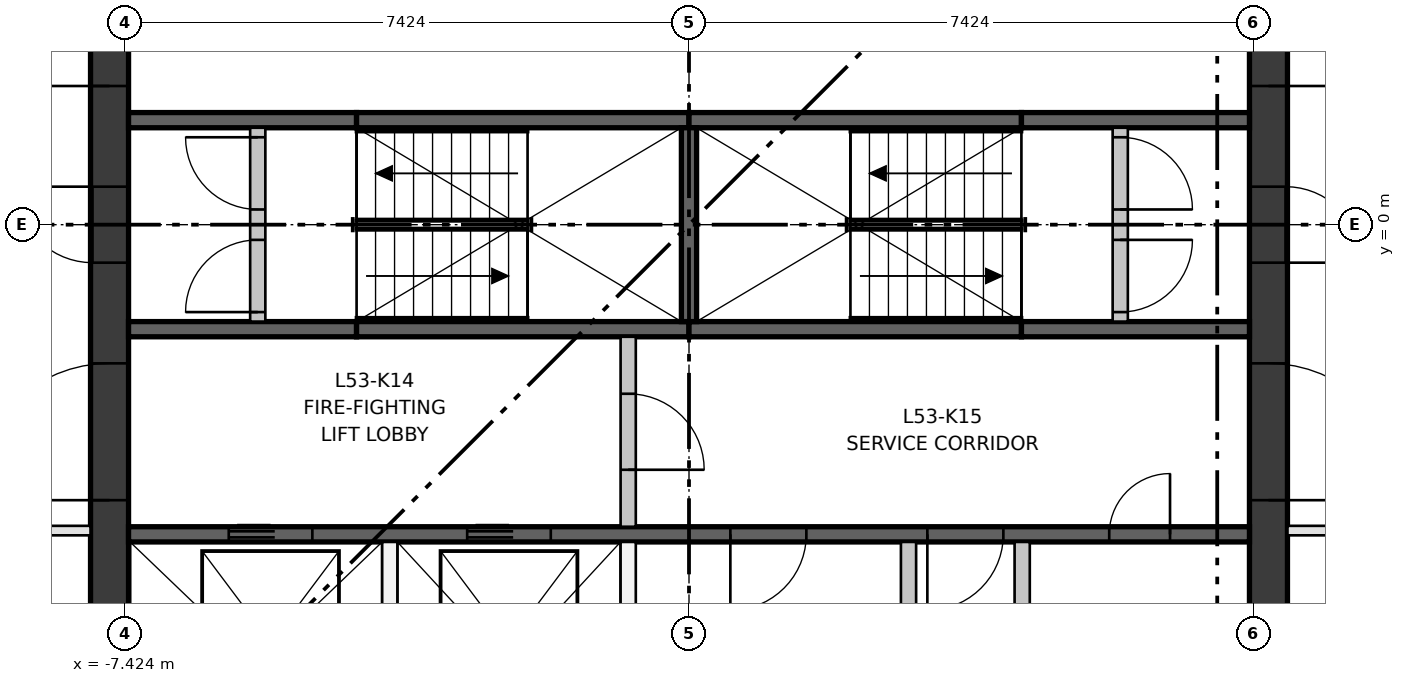
"""IFC4 building model, lengths in metres.
Left out: names, types, materials, properties, quantities, classifications, styles, units other than length and angle.
Written with IfcOpenShell. Run it as: python <this file> out.ifc"""

import sys

from ifc_helpers import new_model, si_unit, direction, frame, frame_2d, origin, place, context, subcontext, project, spatial, rectangle, extrude, element, fill, save


model = new_model("IFC4")
c1 = context("Model", 3, precision=1e-05, world=origin(), true_north=direction((0.0, 1.0)))
c2 = subcontext(c1, "Body", "Model", "MODEL_VIEW")
j1 = project(units=[si_unit("LENGTHUNIT", "METRE"), si_unit("PLANEANGLEUNIT", "RADIAN")], contexts=[c1])
p1 = place(None, origin())
s1 = spatial("IfcSite", under=j1, at=p1, CompositionType="ELEMENT")
p2 = place(p1, origin())
s2 = spatial("IfcBuilding", under=s1, at=p2, CompositionType="ELEMENT")
p3 = place(p2, frame((0.0, 0.0, 197.7)))
s3 = spatial("IfcBuildingStorey", under=s2, at=p3, CompositionType="ELEMENT", Elevation=197.7)
p4 = place(p3, frame((-7.624, -7.374, 0.0), z_axis=(0.0, 0.0, 1.0), x_axis=(0.0, 1.0, 0.0)))
e1 = element("IfcWall", 1, at=p4, inside=s3, PredefinedType="SHEAR", context=c2, shape_type="SweptSolid", body=[
    extrude(rectangle(XDim=14.748, YDim=0.5, at=frame_2d((7.374, 0.0))), origin(), (0.0, 0.0, 1.0), 3.35),
])
p5 = place(p4, frame((6.874, 0.0, 0.0)))
e2 = element("IfcOpeningElement", 2, at=p5, cuts=e1, PredefinedType="OPENING", context=c2, shape_type="SweptSolid", body=[
    extrude(rectangle(XDim=1.0, YDim=2.1, at=frame_2d((0.5, 1.05))), frame((0.0, 0.26, 0.0), z_axis=(0.0, -1.0, 0.0), x_axis=(1.0, 0.0, 0.0)), (0.0, 0.0, 1.0), 0.52),
])
p6 = place(p4, frame((3.75, 0.0, 0.0)))
e3 = element("IfcOpeningElement", 3, at=p6, cuts=e1, PredefinedType="OPENING", context=c2, shape_type="SweptSolid", body=[
    extrude(rectangle(XDim=1.8, YDim=2.1, at=frame_2d((0.9, 1.05))), frame((0.0, 0.26, 0.0), z_axis=(0.0, -1.0, 0.0), x_axis=(1.0, 0.0, 0.0)), (0.0, 0.0, 1.0), 0.52),
])
p7 = place(p4, frame((9.198, 0.0, 0.0)))
e4 = element("IfcOpeningElement", 4, at=p7, cuts=e1, PredefinedType="OPENING", context=c2, shape_type="SweptSolid", body=[
    extrude(rectangle(XDim=1.8, YDim=2.1, at=frame_2d((0.9, 1.05))), frame((0.0, 0.26, 0.0), z_axis=(0.0, -1.0, 0.0), x_axis=(1.0, 0.0, 0.0)), (0.0, 0.0, 1.0), 0.52),
])
p8 = place(p3, frame((7.624, -7.374, 0.0), z_axis=(0.0, 0.0, 1.0), x_axis=(0.0, 1.0, 0.0)))
e5 = element("IfcWall", 5, at=p8, inside=s3, PredefinedType="SHEAR", context=c2, shape_type="SweptSolid", body=[
    extrude(rectangle(XDim=14.748, YDim=0.5, at=frame_2d((7.374, 0.0))), origin(), (0.0, 0.0, 1.0), 3.35),
])
p9 = place(p8, frame((6.874, 0.0, 0.0)))
e6 = element("IfcOpeningElement", 6, at=p9, cuts=e5, PredefinedType="OPENING", context=c2, shape_type="SweptSolid", body=[
    extrude(rectangle(XDim=1.0, YDim=2.1, at=frame_2d((0.5, 1.05))), frame((0.0, 0.26, 0.0), z_axis=(0.0, -1.0, 0.0), x_axis=(1.0, 0.0, 0.0)), (0.0, 0.0, 1.0), 0.52),
])
p10 = place(p8, frame((3.75, 0.0, 0.0)))
e7 = element("IfcOpeningElement", 7, at=p10, cuts=e5, PredefinedType="OPENING", context=c2, shape_type="SweptSolid", body=[
    extrude(rectangle(XDim=1.8, YDim=2.1, at=frame_2d((0.9, 1.05))), frame((0.0, 0.26, 0.0), z_axis=(0.0, -1.0, 0.0), x_axis=(1.0, 0.0, 0.0)), (0.0, 0.0, 1.0), 0.52),
])
p11 = place(p8, frame((9.198, 0.0, 0.0)))
e8 = element("IfcOpeningElement", 8, at=p11, cuts=e5, PredefinedType="OPENING", context=c2, shape_type="SweptSolid", body=[
    extrude(rectangle(XDim=1.8, YDim=2.1, at=frame_2d((0.9, 1.05))), frame((0.0, 0.26, 0.0), z_axis=(0.0, -1.0, 0.0), x_axis=(1.0, 0.0, 0.0)), (0.0, 0.0, 1.0), 0.52),
])
p12 = place(p3, frame((-7.374, -4.074, 0.0), z_axis=(0.0, 0.0, 1.0), x_axis=(1.0, 0.0, 0.0)))
e9 = element("IfcWall", 9, at=p12, inside=s3, PredefinedType="SHEAR", context=c2, shape_type="SweptSolid", body=[
    extrude(rectangle(XDim=14.748, YDim=0.2, at=frame_2d((7.374, 0.0))), origin(), (0.0, 0.0, 1.0), 3.0),
])
p13 = place(p12, frame((1.319, 0.0, 0.0)))
e10 = element("IfcOpeningElement", 10, at=p13, cuts=e9, PredefinedType="OPENING", context=c2, shape_type="SweptSolid", body=[
    extrude(rectangle(XDim=1.1, YDim=2.1, at=frame_2d((0.55, 1.05))), frame((0.0, 0.11, 0.0), z_axis=(0.0, -1.0, 0.0), x_axis=(1.0, 0.0, 0.0)), (0.0, 0.0, 1.0), 0.22),
])
p14 = place(p12, frame((4.456, 0.0, 0.0)))
e11 = element("IfcOpeningElement", 11, at=p14, cuts=e9, PredefinedType="OPENING", context=c2, shape_type="SweptSolid", body=[
    extrude(rectangle(XDim=1.1, YDim=2.1, at=frame_2d((0.55, 1.05))), frame((0.0, 0.11, 0.0), z_axis=(0.0, -1.0, 0.0), x_axis=(1.0, 0.0, 0.0)), (0.0, 0.0, 1.0), 0.22),
])
p15 = place(p12, frame((7.918, 0.0, 0.0)))
e12 = element("IfcOpeningElement", 12, at=p15, cuts=e9, PredefinedType="OPENING", context=c2, shape_type="SweptSolid", body=[
    extrude(rectangle(XDim=1.0, YDim=2.1, at=frame_2d((0.5, 1.05))), frame((0.0, 0.11, 0.0), z_axis=(0.0, -1.0, 0.0), x_axis=(1.0, 0.0, 0.0)), (0.0, 0.0, 1.0), 0.22),
])
p16 = place(p12, frame((10.51, 0.0, 0.0)))
e13 = element("IfcOpeningElement", 13, at=p16, cuts=e9, PredefinedType="OPENING", context=c2, shape_type="SweptSolid", body=[
    extrude(rectangle(XDim=1.0, YDim=2.1, at=frame_2d((0.5, 1.05))), frame((0.0, 0.11, 0.0), z_axis=(0.0, -1.0, 0.0), x_axis=(1.0, 0.0, 0.0)), (0.0, 0.0, 1.0), 0.22),
])
p17 = place(p12, frame((12.903, 0.0, 0.0)))
e14 = element("IfcOpeningElement", 14, at=p17, cuts=e9, PredefinedType="OPENING", context=c2, shape_type="SweptSolid", body=[
    extrude(rectangle(XDim=0.8, YDim=2.1, at=frame_2d((0.4, 1.05))), frame((0.0, 0.11, 0.0), z_axis=(0.0, -1.0, 0.0), x_axis=(1.0, 0.0, 0.0)), (0.0, 0.0, 1.0), 0.22),
])
p18 = place(p3, frame((-7.374, -1.375, 0.0), z_axis=(0.0, 0.0, 1.0), x_axis=(1.0, 0.0, 0.0)))
e15 = element("IfcWall", 15, at=p18, inside=s3, PredefinedType="SHEAR", context=c2, shape_type="SweptSolid", body=[
    extrude(rectangle(XDim=3.0, YDim=0.2, at=frame_2d((1.5, 0.0))), origin(), (0.0, 0.0, 1.0), 3.0),
])
for number, where, z_axis, x_axis in (
    (16, (-4.374, -1.375, 0.0), (0.0, 0.0, 1.0), (1.0, 0.0, 0.0)),
    (17, (0.0, -1.375, 0.0), (0.0, 0.0, 1.0), (1.0, 0.0, 0.0)),
):
    element("IfcWall", number, at=place(p3, frame(where, z_axis=z_axis, x_axis=x_axis)), inside=s3, PredefinedType="SHEAR", context=c2, shape_type="SweptSolid", body=[
        extrude(rectangle(XDim=4.374, YDim=0.2, at=frame_2d((2.187, 0.0))), origin(), (0.0, 0.0, 1.0), 3.0),
    ])
for number, where, z_axis, x_axis in (
    (18, (4.374, -1.375, 0.0), (0.0, 0.0, 1.0), (1.0, 0.0, 0.0)),
    (19, (-7.374, 1.375, 0.0), (0.0, 0.0, 1.0), (1.0, 0.0, 0.0)),
):
    element("IfcWall", number, at=place(p3, frame(where, z_axis=z_axis, x_axis=x_axis)), inside=s3, PredefinedType="SHEAR", context=c2, shape_type="SweptSolid", body=[
        extrude(rectangle(XDim=3.0, YDim=0.2, at=frame_2d((1.5, 0.0))), origin(), (0.0, 0.0, 1.0), 3.0),
    ])
for number, where, z_axis, x_axis in (
    (20, (-4.374, 1.375, 0.0), (0.0, 0.0, 1.0), (1.0, 0.0, 0.0)),
    (21, (0.0, 1.375, 0.0), (0.0, 0.0, 1.0), (1.0, 0.0, 0.0)),
):
    element("IfcWall", number, at=place(p3, frame(where, z_axis=z_axis, x_axis=x_axis)), inside=s3, PredefinedType="SHEAR", context=c2, shape_type="SweptSolid", body=[
        extrude(rectangle(XDim=4.374, YDim=0.2, at=frame_2d((2.187, 0.0))), origin(), (0.0, 0.0, 1.0), 3.0),
    ])
p19 = place(p3, frame((4.374, 1.375, 0.0), z_axis=(0.0, 0.0, 1.0), x_axis=(1.0, 0.0, 0.0)))
e22 = element("IfcWall", 22, at=p19, inside=s3, PredefinedType="SHEAR", context=c2, shape_type="SweptSolid", body=[
    extrude(rectangle(XDim=3.0, YDim=0.2, at=frame_2d((1.5, 0.0))), origin(), (0.0, 0.0, 1.0), 3.0),
])
p20 = place(p3, frame((0.0, -1.275, 0.0), z_axis=(0.0, 0.0, 1.0), x_axis=(0.0, 1.0, 0.0)))
e23 = element("IfcWall", 23, at=p20, inside=s3, PredefinedType="SHEAR", context=c2, shape_type="SweptSolid", body=[
    extrude(rectangle(XDim=2.55, YDim=0.2, at=frame_2d((1.275, 0.0))), origin(), (0.0, 0.0, 1.0), 3.0),
])
for number, where, z_axis, x_axis in (
    (24, (-3.937, -7.374, 0.0), (0.0, 0.0, 1.0), (0.0, 1.0, 0.0)),
    (25, (-0.8, -7.374, 0.0), (0.0, 0.0, 1.0), (0.0, 1.0, 0.0)),
):
    element("IfcWall", number, at=place(p3, frame(where, z_axis=z_axis, x_axis=x_axis)), inside=s3, PredefinedType="PARTITIONING", context=c2, shape_type="SweptSolid", body=[
        extrude(rectangle(XDim=3.2, YDim=0.2, at=frame_2d((1.6, 0.0))), origin(), (0.0, 0.0, 1.0), 3.0),
    ])
p21 = place(p3, frame((-0.8, -3.974, 0.0), z_axis=(0.0, 0.0, 1.0), x_axis=(0.0, 1.0, 0.0)))
e26 = element("IfcWall", 26, at=p21, inside=s3, PredefinedType="PARTITIONING", context=c2, shape_type="SweptSolid", body=[
    extrude(rectangle(XDim=2.499, YDim=0.2, at=frame_2d((1.25, 0.0))), origin(), (0.0, 0.0, 1.0), 3.0),
])
p22 = place(p21, frame((0.75, 0.0, 0.0)))
e27 = element("IfcOpeningElement", 27, at=p22, cuts=e26, PredefinedType="OPENING", context=c2, shape_type="SweptSolid", body=[
    extrude(rectangle(XDim=1.0, YDim=2.1, at=frame_2d((0.5, 1.05))), frame((0.0, 0.11, 0.0), z_axis=(0.0, -1.0, 0.0), x_axis=(1.0, 0.0, 0.0)), (0.0, 0.0, 1.0), 0.22),
])
for number, where, z_axis, x_axis in (
    (28, (2.888, -7.374, 0.0), (0.0, 0.0, 1.0), (0.0, 1.0, 0.0)),
    (29, (4.384, -7.374, 0.0), (0.0, 0.0, 1.0), (0.0, 1.0, 0.0)),
):
    element("IfcWall", number, at=place(p3, frame(where, z_axis=z_axis, x_axis=x_axis)), inside=s3, PredefinedType="PARTITIONING", context=c2, shape_type="SweptSolid", body=[
        extrude(rectangle(XDim=3.2, YDim=0.2, at=frame_2d((1.6, 0.0))), origin(), (0.0, 0.0, 1.0), 3.0),
    ])
p23 = place(p3, frame((-5.674, -1.275, 0.0), z_axis=(0.0, 0.0, 1.0), x_axis=(0.0, 1.0, 0.0)))
e30 = element("IfcWall", 30, at=p23, inside=s3, PredefinedType="PARTITIONING", context=c2, shape_type="SweptSolid", body=[
    extrude(rectangle(XDim=2.55, YDim=0.2, at=frame_2d((1.275, 0.0))), origin(), (0.0, 0.0, 1.0), 3.0),
])
p24 = place(p23, frame((0.125, 0.0, 0.0)))
e31 = element("IfcOpeningElement", 31, at=p24, cuts=e30, PredefinedType="OPENING", context=c2, shape_type="SweptSolid", body=[
    extrude(rectangle(XDim=0.95, YDim=2.1, at=frame_2d((0.475, 1.05))), frame((0.0, 0.11, 0.0), z_axis=(0.0, -1.0, 0.0), x_axis=(1.0, 0.0, 0.0)), (0.0, 0.0, 1.0), 0.22),
])
p25 = place(p23, frame((1.475, 0.0, 0.0)))
e32 = element("IfcOpeningElement", 32, at=p25, cuts=e30, PredefinedType="OPENING", context=c2, shape_type="SweptSolid", body=[
    extrude(rectangle(XDim=0.95, YDim=2.1, at=frame_2d((0.475, 1.05))), frame((0.0, 0.11, 0.0), z_axis=(0.0, -1.0, 0.0), x_axis=(1.0, 0.0, 0.0)), (0.0, 0.0, 1.0), 0.22),
])
p26 = place(p3, frame((5.674, -1.275, 0.0), z_axis=(0.0, 0.0, 1.0), x_axis=(0.0, 1.0, 0.0)))
e33 = element("IfcWall", 33, at=p26, inside=s3, PredefinedType="PARTITIONING", context=c2, shape_type="SweptSolid", body=[
    extrude(rectangle(XDim=2.55, YDim=0.2, at=frame_2d((1.275, 0.0))), origin(), (0.0, 0.0, 1.0), 3.0),
])
p27 = place(p26, frame((0.125, 0.0, 0.0)))
e34 = element("IfcOpeningElement", 34, at=p27, cuts=e33, PredefinedType="OPENING", context=c2, shape_type="SweptSolid", body=[
    extrude(rectangle(XDim=0.95, YDim=2.1, at=frame_2d((0.475, 1.05))), frame((0.0, 0.11, 0.0), z_axis=(0.0, -1.0, 0.0), x_axis=(1.0, 0.0, 0.0)), (0.0, 0.0, 1.0), 0.22),
])
p28 = place(p26, frame((1.475, 0.0, 0.0)))
e35 = element("IfcOpeningElement", 35, at=p28, cuts=e33, PredefinedType="OPENING", context=c2, shape_type="SweptSolid", body=[
    extrude(rectangle(XDim=0.95, YDim=2.1, at=frame_2d((0.475, 1.05))), frame((0.0, 0.11, 0.0), z_axis=(0.0, -1.0, 0.0), x_axis=(1.0, 0.0, 0.0)), (0.0, 0.0, 1.0), 0.22),
])
p29 = place(p3, frame((12.404, -4.024, 0.0), z_axis=(0.0, 0.0, 1.0), x_axis=(-1.0, 0.0, 0.0)))
e36 = element("IfcWall", 36, at=p29, inside=s3, PredefinedType="PARTITIONING", context=c2, shape_type="SweptSolid", body=[
    extrude(rectangle(XDim=4.53, YDim=0.125, at=frame_2d((2.265, 0.0))), origin(), (0.0, 0.0, 1.0), 3.0),
])
p30 = place(p29, frame((1.4, 0.0, 0.0)))
e37 = element("IfcOpeningElement", 37, at=p30, cuts=e36, PredefinedType="OPENING", context=c2, shape_type="SweptSolid", body=[
    extrude(rectangle(XDim=1.8, YDim=2.1, at=frame_2d((0.9, 1.05))), frame((0.0, 0.073, 0.0), z_axis=(0.0, -1.0, 0.0), x_axis=(1.0, 0.0, 0.0)), (0.0, 0.0, 1.0), 0.145),
])
p31 = place(p3, frame((-7.874, -4.024, 0.0), z_axis=(0.0, 0.0, 1.0), x_axis=(-1.0, 0.0, 0.0)))
e38 = element("IfcWall", 38, at=p31, inside=s3, PredefinedType="PARTITIONING", context=c2, shape_type="SweptSolid", body=[
    extrude(rectangle(XDim=4.951, YDim=0.125, at=frame_2d((2.476, 0.0))), origin(), (0.0, 0.0, 1.0), 3.0),
])
p32 = place(p31, frame((1.6, 0.0, 0.0)))
e39 = element("IfcOpeningElement", 39, at=p32, cuts=e38, PredefinedType="OPENING", context=c2, shape_type="SweptSolid", body=[
    extrude(rectangle(XDim=1.8, YDim=2.1, at=frame_2d((0.9, 1.05))), frame((0.0, 0.073, 0.0), z_axis=(0.0, -1.0, 0.0), x_axis=(1.0, 0.0, 0.0)), (0.0, 0.0, 1.0), 0.145),
])
p33 = place(p13, origin())
e40 = element("IfcDoor", 40, at=p33, inside=s3, OperationType="DOUBLE_DOOR_SLIDING", PredefinedType="DOOR", context=c2, shape_type="SweptSolid", body=[
    extrude(rectangle(XDim=1.1, YDim=2.1, at=frame_2d((0.55, 1.05))), frame((0.0, 0.025, 0.0), z_axis=(0.0, -1.0, 0.0), x_axis=(1.0, 0.0, 0.0)), (0.0, 0.0, 1.0), 0.05),
])
fill(e10, e40)
p34 = place(p14, origin())
e41 = element("IfcDoor", 41, at=p34, inside=s3, OperationType="DOUBLE_DOOR_SLIDING", PredefinedType="DOOR", context=c2, shape_type="SweptSolid", body=[
    extrude(rectangle(XDim=1.1, YDim=2.1, at=frame_2d((0.55, 1.05))), frame((0.0, 0.025, 0.0), z_axis=(0.0, -1.0, 0.0), x_axis=(1.0, 0.0, 0.0)), (0.0, 0.0, 1.0), 0.05),
])
fill(e11, e41)
p35 = place(p24, origin())
e42 = element("IfcDoor", 42, at=p35, inside=s3, OperationType="SINGLE_SWING_LEFT", PredefinedType="DOOR", context=c2, shape_type="SweptSolid", body=[
    extrude(rectangle(XDim=0.95, YDim=2.1, at=frame_2d((0.475, 1.05))), frame((0.0, 0.025, 0.0), z_axis=(0.0, -1.0, 0.0), x_axis=(1.0, 0.0, 0.0)), (0.0, 0.0, 1.0), 0.05),
])
fill(e31, e42)
p36 = place(p25, origin())
e43 = element("IfcDoor", 43, at=p36, inside=s3, OperationType="SINGLE_SWING_RIGHT", PredefinedType="DOOR", context=c2, shape_type="SweptSolid", body=[
    extrude(rectangle(XDim=0.95, YDim=2.1, at=frame_2d((0.475, 1.05))), frame((0.0, 0.025, 0.0), z_axis=(0.0, -1.0, 0.0), x_axis=(1.0, 0.0, 0.0)), (0.0, 0.0, 1.0), 0.05),
])
fill(e32, e43)
p37 = place(p27, frame((0.95, 0.0, 0.0), z_axis=(0.0, 0.0, 1.0), x_axis=(-1.0, 0.0, 0.0)))
e44 = element("IfcDoor", 44, at=p37, inside=s3, OperationType="SINGLE_SWING_RIGHT", PredefinedType="DOOR", context=c2, shape_type="SweptSolid", body=[
    extrude(rectangle(XDim=0.95, YDim=2.1, at=frame_2d((0.475, 1.05))), frame((0.0, 0.025, 0.0), z_axis=(0.0, -1.0, 0.0), x_axis=(1.0, 0.0, 0.0)), (0.0, 0.0, 1.0), 0.05),
])
fill(e34, e44)
p38 = place(p28, frame((0.95, 0.0, 0.0), z_axis=(0.0, 0.0, 1.0), x_axis=(-1.0, 0.0, 0.0)))
e45 = element("IfcDoor", 45, at=p38, inside=s3, OperationType="SINGLE_SWING_LEFT", PredefinedType="DOOR", context=c2, shape_type="SweptSolid", body=[
    extrude(rectangle(XDim=0.95, YDim=2.1, at=frame_2d((0.475, 1.05))), frame((0.0, 0.025, 0.0), z_axis=(0.0, -1.0, 0.0), x_axis=(1.0, 0.0, 0.0)), (0.0, 0.0, 1.0), 0.05),
])
fill(e35, e45)
p39 = place(p22, frame((1.0, 0.0, 0.0), z_axis=(0.0, 0.0, 1.0), x_axis=(-1.0, 0.0, 0.0)))
e46 = element("IfcDoor", 46, at=p39, inside=s3, OperationType="SINGLE_SWING_LEFT", PredefinedType="DOOR", context=c2, shape_type="SweptSolid", body=[
    extrude(rectangle(XDim=1.0, YDim=2.1, at=frame_2d((0.5, 1.05))), frame((0.0, 0.025, 0.0), z_axis=(0.0, -1.0, 0.0), x_axis=(1.0, 0.0, 0.0)), (0.0, 0.0, 1.0), 0.05),
])
fill(e27, e46)
p40 = place(p15, frame((1.0, 0.0, 0.0), z_axis=(0.0, 0.0, 1.0), x_axis=(-1.0, 0.0, 0.0)))
e47 = element("IfcDoor", 47, at=p40, inside=s3, OperationType="SINGLE_SWING_LEFT", PredefinedType="DOOR", context=c2, shape_type="SweptSolid", body=[
    extrude(rectangle(XDim=1.0, YDim=2.1, at=frame_2d((0.5, 1.05))), frame((0.0, 0.025, 0.0), z_axis=(0.0, -1.0, 0.0), x_axis=(1.0, 0.0, 0.0)), (0.0, 0.0, 1.0), 0.05),
])
fill(e12, e47)
p41 = place(p16, frame((1.0, 0.0, 0.0), z_axis=(0.0, 0.0, 1.0), x_axis=(-1.0, 0.0, 0.0)))
e48 = element("IfcDoor", 48, at=p41, inside=s3, OperationType="SINGLE_SWING_LEFT", PredefinedType="DOOR", context=c2, shape_type="SweptSolid", body=[
    extrude(rectangle(XDim=1.0, YDim=2.1, at=frame_2d((0.5, 1.05))), frame((0.0, 0.025, 0.0), z_axis=(0.0, -1.0, 0.0), x_axis=(1.0, 0.0, 0.0)), (0.0, 0.0, 1.0), 0.05),
])
fill(e13, e48)
p42 = place(p17, origin())
e49 = element("IfcDoor", 49, at=p42, inside=s3, OperationType="SINGLE_SWING_RIGHT", PredefinedType="DOOR", context=c2, shape_type="SweptSolid", body=[
    extrude(rectangle(XDim=0.8, YDim=2.1, at=frame_2d((0.4, 1.05))), frame((0.0, 0.025, 0.0), z_axis=(0.0, -1.0, 0.0), x_axis=(1.0, 0.0, 0.0)), (0.0, 0.0, 1.0), 0.05),
])
fill(e14, e49)
p43 = place(p5, origin())
e50 = element("IfcDoor", 50, at=p43, inside=s3, OperationType="SINGLE_SWING_RIGHT", PredefinedType="DOOR", context=c2, shape_type="SweptSolid", body=[
    extrude(rectangle(XDim=1.0, YDim=2.1, at=frame_2d((0.5, 1.05))), frame((0.0, 0.25, 0.0), z_axis=(0.0, -1.0, 0.0), x_axis=(1.0, 0.0, 0.0)), (0.0, 0.0, 1.0), 0.05),
])
fill(e2, e50)
p44 = place(p6, origin())
e51 = element("IfcDoor", 51, at=p44, inside=s3, OperationType="DOUBLE_DOOR_SINGLE_SWING", PredefinedType="DOOR", context=c2, shape_type="SweptSolid", body=[
    extrude(rectangle(XDim=1.8, YDim=2.1, at=frame_2d((0.9, 1.05))), frame((0.0, 0.025, 0.0), z_axis=(0.0, -1.0, 0.0), x_axis=(1.0, 0.0, 0.0)), (0.0, 0.0, 1.0), 0.05),
])
fill(e3, e51)
p45 = place(p7, origin())
e52 = element("IfcDoor", 52, at=p45, inside=s3, OperationType="DOUBLE_DOOR_SINGLE_SWING", PredefinedType="DOOR", context=c2, shape_type="SweptSolid", body=[
    extrude(rectangle(XDim=1.8, YDim=2.1, at=frame_2d((0.9, 1.05))), frame((0.0, 0.025, 0.0), z_axis=(0.0, -1.0, 0.0), x_axis=(1.0, 0.0, 0.0)), (0.0, 0.0, 1.0), 0.05),
])
fill(e4, e52)
p46 = place(p9, frame((1.0, 0.0, 0.0), z_axis=(0.0, 0.0, 1.0), x_axis=(-1.0, 0.0, 0.0)))
e53 = element("IfcDoor", 53, at=p46, inside=s3, OperationType="SINGLE_SWING_LEFT", PredefinedType="DOOR", context=c2, shape_type="SweptSolid", body=[
    extrude(rectangle(XDim=1.0, YDim=2.1, at=frame_2d((0.5, 1.05))), frame((0.0, 0.25, 0.0), z_axis=(0.0, -1.0, 0.0), x_axis=(1.0, 0.0, 0.0)), (0.0, 0.0, 1.0), 0.05),
])
fill(e6, e53)
p47 = place(p10, frame((1.8, 0.0, 0.0), z_axis=(0.0, 0.0, 1.0), x_axis=(-1.0, 0.0, 0.0)))
e54 = element("IfcDoor", 54, at=p47, inside=s3, OperationType="DOUBLE_DOOR_SINGLE_SWING", PredefinedType="DOOR", context=c2, shape_type="SweptSolid", body=[
    extrude(rectangle(XDim=1.8, YDim=2.1, at=frame_2d((0.9, 1.05))), frame((0.0, 0.025, 0.0), z_axis=(0.0, -1.0, 0.0), x_axis=(1.0, 0.0, 0.0)), (0.0, 0.0, 1.0), 0.05),
])
fill(e7, e54)
p48 = place(p11, frame((1.8, 0.0, 0.0), z_axis=(0.0, 0.0, 1.0), x_axis=(-1.0, 0.0, 0.0)))
e55 = element("IfcDoor", 55, at=p48, inside=s3, OperationType="DOUBLE_DOOR_SINGLE_SWING", PredefinedType="DOOR", context=c2, shape_type="SweptSolid", body=[
    extrude(rectangle(XDim=1.8, YDim=2.1, at=frame_2d((0.9, 1.05))), frame((0.0, 0.025, 0.0), z_axis=(0.0, -1.0, 0.0), x_axis=(1.0, 0.0, 0.0)), (0.0, 0.0, 1.0), 0.05),
])
fill(e8, e55)
save(model, sys.argv[1])
